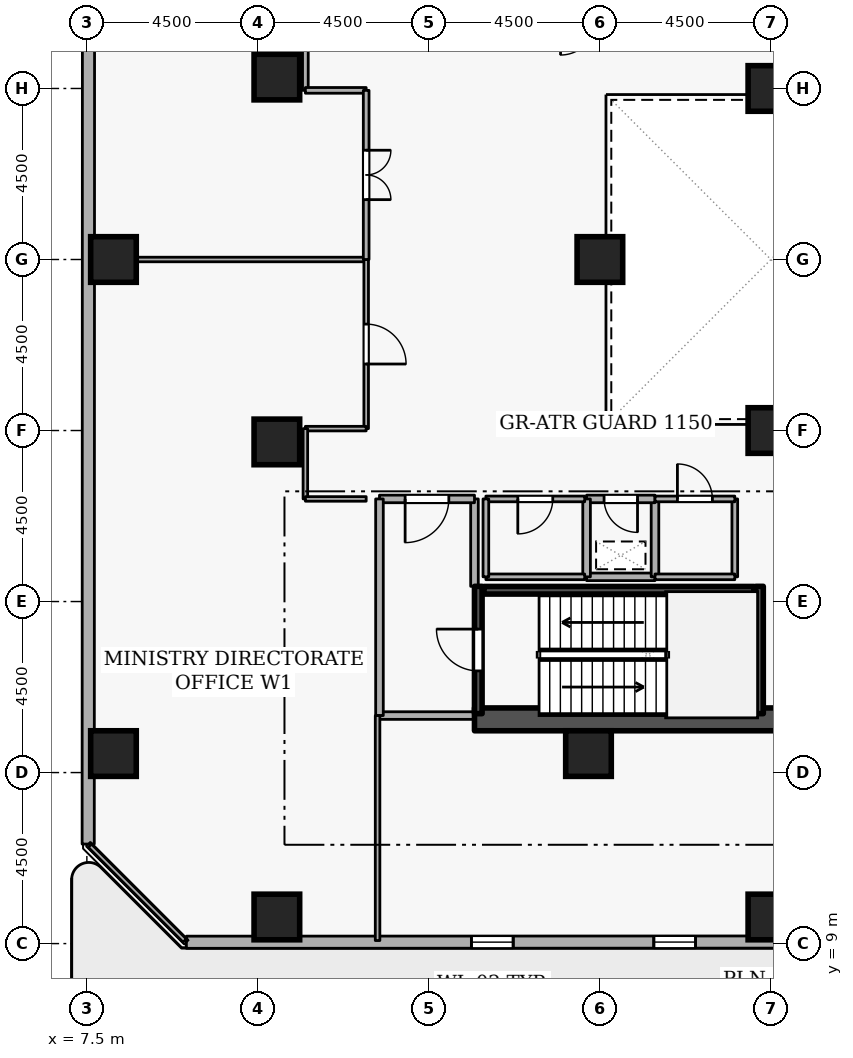
"""IFC4 building model, lengths in metres.
Left out: names, types, materials, properties, quantities, classifications, styles, units other than length and angle.
Written with IfcOpenShell. Run it as: python <this file> out.ifc"""

import sys

from ifc_helpers import new_model, si_unit, direction, frame, frame_2d, origin, origin_2d, place, context, subcontext, project, spatial, rectangle, extrude, element, fill, save


model = new_model("IFC4")
c1 = context("Model", 3, precision=1e-05, world=origin(), true_north=direction((0.0, 1.0)))
c2 = subcontext(c1, "Body", "Model", "MODEL_VIEW")
j1 = project(units=[si_unit("LENGTHUNIT", "METRE"), si_unit("PLANEANGLEUNIT", "RADIAN")], contexts=[c1])
p1 = place(None, origin())
s1 = spatial("IfcSite", under=j1, at=p1, CompositionType="ELEMENT")
p2 = place(p1, origin())
s2 = spatial("IfcBuilding", under=s1, at=p2, CompositionType="ELEMENT")
p3 = place(p2, frame((0.0, 0.0, 75.9)))
s3 = spatial("IfcBuildingStorey", under=s2, at=p3, CompositionType="ELEMENT", Elevation=75.9)
p4 = place(p3, frame((17.7, 14.9, 0.0), z_axis=(0.0, 0.0, 1.0), x_axis=(1.0, 0.0, 0.0)))
e1 = element("IfcWall", 1, at=p4, inside=s3, PredefinedType="SHEAR", context=c2, shape_type="SweptSolid", body=[
    extrude(rectangle(XDim=15.6, YDim=0.6, at=frame_2d((7.8, 0.0))), origin(), (0.0, 0.0, 1.0), 4.2),
])
for number, where, z_axis, x_axis in (
    (2, (12.5, 9.7, 0.0), (0.0, 0.0, 1.0), (1.0, 0.0, 0.0)),
    (3, (25.5, 9.7, 0.0), (0.0, 0.0, 1.0), (1.0, 0.0, 0.0)),
    (4, (8.2, 14.0, 0.0), (0.0, 0.0, 1.0), (1.0, 0.0, 0.0)),
    (5, (8.2, 27.0, 0.0), (0.0, 0.0, 1.0), (1.0, 0.0, 0.0)),
    (6, (12.5, 22.2, 0.0), (0.0, 0.0, 1.0), (1.0, 0.0, 0.0)),
    (7, (12.5, 31.8, 0.0), (0.0, 0.0, 1.0), (1.0, 0.0, 0.0)),
    (8, (20.7, 14.0, 0.0), (0.0, 0.0, 1.0), (1.0, 0.0, 0.0)),
    (9, (25.5, 22.5, 0.0), (0.0, 0.0, 1.0), (1.0, 0.0, 0.0)),
    (10, (25.5, 31.5, 0.0), (0.0, 0.0, 1.0), (1.0, 0.0, 0.0)),
    (11, (21.0, 27.0, 0.0), (0.0, 0.0, 1.0), (1.0, 0.0, 0.0)),
):
    element("IfcColumn", number, at=place(p3, frame(where, z_axis=z_axis, x_axis=x_axis)), inside=s3, PredefinedType="COLUMN", context=c2, shape_type="SweptSolid", body=[
        extrude(rectangle(XDim=1.2, YDim=1.2, at=origin_2d()), origin(), (0.0, 0.0, 1.0), 4.2),
    ])
p5 = place(p3, frame((10.119, 9.035, 0.0), z_axis=(0.0, 0.0, 1.0), x_axis=(0.99999993762, 0.000353213856, 0.0)))
e12 = element("IfcWall", 12, at=p5, inside=s3, PredefinedType="STANDARD", context=c2, shape_type="SweptSolid", body=[
    extrude(rectangle(XDim=33.177, YDim=0.32, at=frame_2d((16.589, 0.0))), origin(), (0.0, 0.0, 1.0), 3.3),
])
p6 = place(p5, frame((30.014, 0.0, 0.0)))
e13 = element("IfcOpeningElement", 13, at=p6, cuts=e12, PredefinedType="OPENING", context=c2, shape_type="SweptSolid", body=[
    extrude(rectangle(XDim=1.15, YDim=2.1, at=frame_2d((0.575, 1.05))), frame((0.0, 0.17, 0.0), z_axis=(0.0, -1.0, 0.0), x_axis=(1.0, 0.0, 0.0)), (0.0, 0.0, 1.0), 0.34),
])
p7 = place(p5, frame((7.5, 0.0, 0.72)))
e14 = element("IfcOpeningElement", 14, at=p7, cuts=e12, PredefinedType="OPENING", context=c2, shape_type="SweptSolid", body=[
    extrude(rectangle(XDim=1.1, YDim=1.8, at=frame_2d((0.55, 0.9))), frame((0.0, 0.17, 0.0), z_axis=(0.0, -1.0, 0.0), x_axis=(1.0, 0.0, 0.0)), (0.0, 0.0, 1.0), 0.34),
])
p8 = place(p5, frame((12.3, 0.0, 0.72)))
e15 = element("IfcOpeningElement", 15, at=p8, cuts=e12, PredefinedType="OPENING", context=c2, shape_type="SweptSolid", body=[
    extrude(rectangle(XDim=1.1, YDim=1.8, at=frame_2d((0.55, 0.9))), frame((0.0, 0.17, 0.0), z_axis=(0.0, -1.0, 0.0), x_axis=(1.0, 0.0, 0.0)), (0.0, 0.0, 1.0), 0.34),
])
p9 = place(p5, frame((17.1, 0.0, 0.72)))
e16 = element("IfcOpeningElement", 16, at=p9, cuts=e12, PredefinedType="OPENING", context=c2, shape_type="SweptSolid", body=[
    extrude(rectangle(XDim=1.1, YDim=1.8, at=frame_2d((0.55, 0.9))), frame((0.0, 0.17, 0.0), z_axis=(0.0, -1.0, 0.0), x_axis=(1.0, 0.0, 0.0)), (0.0, 0.0, 1.0), 0.34),
])
p10 = place(p5, frame((21.9, 0.0, 0.72)))
e17 = element("IfcOpeningElement", 17, at=p10, cuts=e12, PredefinedType="OPENING", context=c2, shape_type="SweptSolid", body=[
    extrude(rectangle(XDim=1.1, YDim=1.8, at=frame_2d((0.55, 0.9))), frame((0.0, 0.17, 0.0), z_axis=(0.0, -1.0, 0.0), x_axis=(1.0, 0.0, 0.0)), (0.0, 0.0, 1.0), 0.34),
])
p11 = place(p3, frame((7.547, 44.796, 0.0), z_axis=(0.0, 0.0, 1.0), x_axis=(-0.000353213856, -0.99999993762, 0.0)))
e18 = element("IfcWall", 18, at=p11, inside=s3, PredefinedType="STANDARD", context=c2, shape_type="SweptSolid", body=[
    extrude(rectangle(XDim=33.177, YDim=0.32, at=frame_2d((16.589, 0.0))), origin(), (0.0, 0.0, 1.0), 3.3),
])
p12 = place(p3, frame((17.8, 15.05, 0.0), z_axis=(0.0, 0.0, 1.0), x_axis=(0.0, 1.0, 0.0)))
e19 = element("IfcWall", 19, at=p12, inside=s3, PredefinedType="SHEAR", context=c2, shape_type="SweptSolid", body=[
    extrude(rectangle(XDim=3.35, YDim=0.2, at=frame_2d((1.675, 0.0))), origin(), (0.0, 0.0, 1.0), 4.2),
])
p13 = place(p12, frame((1.125, 0.0, 0.0)))
e20 = element("IfcOpeningElement", 20, at=p13, cuts=e19, PredefinedType="OPENING", context=c2, shape_type="SweptSolid", body=[
    extrude(rectangle(XDim=1.1, YDim=2.1, at=frame_2d((0.55, 1.05))), frame((0.0, 0.11, 0.0), z_axis=(0.0, -1.0, 0.0), x_axis=(1.0, 0.0, 0.0)), (0.0, 0.0, 1.0), 0.22),
])
p14 = place(p3, frame((25.2, 18.4, 0.0), z_axis=(0.0, 0.0, 1.0), x_axis=(0.0, -1.0, 0.0)))
e21 = element("IfcWall", 21, at=p14, inside=s3, PredefinedType="SHEAR", context=c2, shape_type="SweptSolid", body=[
    extrude(rectangle(XDim=3.35, YDim=0.2, at=frame_2d((1.675, 0.0))), origin(), (0.0, 0.0, 1.0), 4.2),
])
p15 = place(p3, frame((25.05, 18.297, 0.0), z_axis=(0.0, 0.0, 1.0), x_axis=(-1.0, 0.0, 0.0)))
e22 = element("IfcWall", 22, at=p15, inside=s3, PredefinedType="SHEAR", context=c2, shape_type="SweptSolid", body=[
    extrude(rectangle(XDim=7.1, YDim=0.2, at=frame_2d((3.55, 0.0))), origin(), (0.0, 0.0, 1.0), 4.2),
])
p16 = place(p3, frame((15.2, 15.0, 0.0), z_axis=(0.0, 0.0, 1.0), x_axis=(1.0, 0.0, 0.0)))
e23 = element("IfcWall", 23, at=p16, inside=s3, PredefinedType="STANDARD", context=c2, shape_type="SweptSolid", body=[
    extrude(rectangle(XDim=2.5, YDim=0.2, at=frame_2d((1.25, 0.0))), origin(), (0.0, 0.0, 1.0), 3.94),
])
p17 = place(p3, frame((17.7, 18.4, 0.0), z_axis=(0.0, 0.0, 1.0), x_axis=(0.0, 1.0, 0.0)))
e24 = element("IfcWall", 24, at=p17, inside=s3, PredefinedType="STANDARD", context=c2, shape_type="SweptSolid", body=[
    extrude(rectangle(XDim=2.3, YDim=0.2, at=frame_2d((1.15, 0.0))), origin(), (0.0, 0.0, 1.0), 3.145),
])
p18 = place(p3, frame((17.7, 20.7, 0.0), z_axis=(0.0, 0.0, 1.0), x_axis=(-1.0, 0.0, 0.0)))
e25 = element("IfcWall", 25, at=p18, inside=s3, PredefinedType="STANDARD", context=c2, shape_type="SweptSolid", body=[
    extrude(rectangle(XDim=2.5, YDim=0.2, at=frame_2d((1.25, 0.0))), origin(), (0.0, 0.0, 1.0), 3.94),
])
p19 = place(p18, frame((0.675, 0.0, 0.0)))
e26 = element("IfcOpeningElement", 26, at=p19, cuts=e25, PredefinedType="OPENING", context=c2, shape_type="SweptSolid", body=[
    extrude(rectangle(XDim=1.15, YDim=2.1, at=frame_2d((0.575, 1.05))), frame((0.0, 0.11, 0.0), z_axis=(0.0, -1.0, 0.0), x_axis=(1.0, 0.0, 0.0)), (0.0, 0.0, 1.0), 0.22),
])
p20 = place(p3, frame((15.2, 20.7, 0.0), z_axis=(0.0, 0.0, 1.0), x_axis=(0.0, -1.0, 0.0)))
e27 = element("IfcWall", 27, at=p20, inside=s3, PredefinedType="STANDARD", context=c2, shape_type="SweptSolid", body=[
    extrude(rectangle(XDim=5.7, YDim=0.2, at=frame_2d((2.85, 0.0))), origin(), (0.0, 0.0, 1.0), 3.94),
])
p21 = place(p3, frame((20.65, 18.65, 0.0), z_axis=(0.0, 0.0, 1.0), x_axis=(1.0, 0.0, 0.0)))
e28 = element("IfcWall", 28, at=p21, inside=s3, PredefinedType="STANDARD", context=c2, shape_type="SweptSolid", body=[
    extrude(rectangle(XDim=1.8, YDim=0.2, at=frame_2d((0.9, 0.0))), origin(), (0.0, 0.0, 1.0), 3.94),
])
p22 = place(p3, frame((22.45, 18.65, 0.0), z_axis=(0.0, 0.0, 1.0), x_axis=(0.0, 1.0, 0.0)))
e29 = element("IfcWall", 29, at=p22, inside=s3, PredefinedType="STANDARD", context=c2, shape_type="SweptSolid", body=[
    extrude(rectangle(XDim=2.05, YDim=0.2, at=frame_2d((1.025, 0.0))), origin(), (0.0, 0.0, 1.0), 3.94),
])
p23 = place(p3, frame((22.45, 20.7, 0.0), z_axis=(0.0, 0.0, 1.0), x_axis=(-1.0, 0.0, 0.0)))
e30 = element("IfcWall", 30, at=p23, inside=s3, PredefinedType="STANDARD", context=c2, shape_type="SweptSolid", body=[
    extrude(rectangle(XDim=1.8, YDim=0.2, at=frame_2d((0.9, 0.0))), origin(), (0.0, 0.0, 1.0), 3.94),
])
p24 = place(p23, frame((0.46, 0.0, 0.0)))
e31 = element("IfcOpeningElement", 31, at=p24, cuts=e30, PredefinedType="OPENING", context=c2, shape_type="SweptSolid", body=[
    extrude(rectangle(XDim=0.88, YDim=2.04, at=frame_2d((0.44, 1.02))), frame((0.0, 0.11, 0.0), z_axis=(0.0, -1.0, 0.0), x_axis=(1.0, 0.0, 0.0)), (0.0, 0.0, 1.0), 0.22),
])
p25 = place(p3, frame((20.65, 20.7, 0.0), z_axis=(0.0, 0.0, 1.0), x_axis=(0.0, -1.0, 0.0)))
e32 = element("IfcWall", 32, at=p25, inside=s3, PredefinedType="STANDARD", context=c2, shape_type="SweptSolid", body=[
    extrude(rectangle(XDim=2.05, YDim=0.2, at=frame_2d((1.025, 0.0))), origin(), (0.0, 0.0, 1.0), 3.94),
])
p26 = place(p3, frame((18.0, 18.65, 0.0), z_axis=(0.0, 0.0, 1.0), x_axis=(1.0, 0.0, 0.0)))
e33 = element("IfcWall", 33, at=p26, inside=s3, PredefinedType="PARTITIONING", context=c2, shape_type="SweptSolid", body=[
    extrude(rectangle(XDim=2.6, YDim=0.15, at=frame_2d((1.3, 0.0))), origin(), (0.0, 0.0, 1.0), 3.94),
])
p27 = place(p3, frame((20.6, 20.7, 0.0), z_axis=(0.0, 0.0, 1.0), x_axis=(-1.0, 0.0, 0.0)))
e34 = element("IfcWall", 34, at=p27, inside=s3, PredefinedType="PARTITIONING", context=c2, shape_type="SweptSolid", body=[
    extrude(rectangle(XDim=2.6, YDim=0.15, at=frame_2d((1.3, 0.0))), origin(), (0.0, 0.0, 1.0), 3.94),
])
p28 = place(p27, frame((0.84, 0.0, 0.0)))
e35 = element("IfcOpeningElement", 35, at=p28, cuts=e34, PredefinedType="OPENING", context=c2, shape_type="SweptSolid", body=[
    extrude(rectangle(XDim=0.92, YDim=2.08, at=frame_2d((0.46, 1.04))), frame((0.0, 0.085, 0.0), z_axis=(0.0, -1.0, 0.0), x_axis=(1.0, 0.0, 0.0)), (0.0, 0.0, 1.0), 0.17),
])
p29 = place(p3, frame((18.0, 20.7, 0.0), z_axis=(0.0, 0.0, 1.0), x_axis=(0.0, -1.0, 0.0)))
e36 = element("IfcWall", 36, at=p29, inside=s3, PredefinedType="PARTITIONING", context=c2, shape_type="SweptSolid", body=[
    extrude(rectangle(XDim=2.05, YDim=0.15, at=frame_2d((1.025, 0.0))), origin(), (0.0, 0.0, 1.0), 3.145),
])
p30 = place(p3, frame((24.55, 20.7, 0.0), z_axis=(0.0, 0.0, 1.0), x_axis=(0.0, -1.0, 0.0)))
e37 = element("IfcWall", 37, at=p30, inside=s3, PredefinedType="PARTITIONING", context=c2, shape_type="SweptSolid", body=[
    extrude(rectangle(XDim=2.05, YDim=0.15, at=frame_2d((1.025, 0.0))), origin(), (0.0, 0.0, 1.0), 3.94),
])
p31 = place(p3, frame((24.55, 18.65, 0.0), z_axis=(0.0, 0.0, 1.0), x_axis=(-1.0, 0.0, 0.0)))
e38 = element("IfcWall", 38, at=p31, inside=s3, PredefinedType="PARTITIONING", context=c2, shape_type="SweptSolid", body=[
    extrude(rectangle(XDim=2.1, YDim=0.15, at=frame_2d((1.05, 0.0))), origin(), (0.0, 0.0, 1.0), 3.94),
])
p32 = place(p3, frame((22.45, 20.7, 0.0), z_axis=(0.0, 0.0, 1.0), x_axis=(1.0, 0.0, 0.0)))
e39 = element("IfcWall", 39, at=p32, inside=s3, PredefinedType="PARTITIONING", context=c2, shape_type="SweptSolid", body=[
    extrude(rectangle(XDim=2.1, YDim=0.15, at=frame_2d((1.05, 0.0))), origin(), (0.0, 0.0, 1.0), 3.94),
])
p33 = place(p32, frame((0.59, 0.0, 0.0)))
e40 = element("IfcOpeningElement", 40, at=p33, cuts=e39, PredefinedType="OPENING", context=c2, shape_type="SweptSolid", body=[
    extrude(rectangle(XDim=0.92, YDim=2.08, at=frame_2d((0.46, 1.04))), frame((0.0, 0.085, 0.0), z_axis=(0.0, -1.0, 0.0), x_axis=(1.0, 0.0, 0.0)), (0.0, 0.0, 1.0), 0.17),
])
p34 = place(p3, frame((7.58, 27.0, 0.0), z_axis=(0.0, 0.0, 1.0), x_axis=(1.0, 0.0, 0.0)))
e41 = element("IfcWall", 41, at=p34, inside=s3, PredefinedType="PARTITIONING", context=c2, shape_type="SweptSolid", body=[
    extrude(rectangle(XDim=7.27, YDim=0.12, at=frame_2d((3.635, 0.0))), origin(), (0.0, 0.0, 1.0), 3.482),
])
p35 = place(p3, frame((14.85, 27.0, 0.0), z_axis=(0.0, 0.0, 1.0), x_axis=(0.0, -1.0, 0.0)))
e42 = element("IfcWall", 42, at=p35, inside=s3, PredefinedType="PARTITIONING", context=c2, shape_type="SweptSolid", body=[
    extrude(rectangle(XDim=4.45, YDim=0.12, at=frame_2d((2.225, 0.0))), origin(), (0.0, 0.0, 1.0), 3.94),
])
p36 = place(p35, frame((1.7, 0.0, 0.0)))
e43 = element("IfcOpeningElement", 43, at=p36, cuts=e42, PredefinedType="OPENING", context=c2, shape_type="SweptSolid", body=[
    extrude(rectangle(XDim=1.05, YDim=2.1, at=frame_2d((0.525, 1.05))), frame((0.0, 0.07, 0.0), z_axis=(0.0, -1.0, 0.0), x_axis=(1.0, 0.0, 0.0)), (0.0, 0.0, 1.0), 0.14),
])
p37 = place(p3, frame((14.85, 22.55, 0.0), z_axis=(0.0, 0.0, 1.0), x_axis=(-1.0, 0.0, 0.0)))
e44 = element("IfcWall", 44, at=p37, inside=s3, PredefinedType="PARTITIONING", context=c2, shape_type="SweptSolid", body=[
    extrude(rectangle(XDim=1.6, YDim=0.12, at=frame_2d((0.8, 0.0))), origin(), (0.0, 0.0, 1.0), 3.94),
])
p38 = place(p3, frame((13.25, 22.55, 0.0), z_axis=(0.0, 0.0, 1.0), x_axis=(0.0, -1.0, 0.0)))
e45 = element("IfcWall", 45, at=p38, inside=s3, PredefinedType="PARTITIONING", context=c2, shape_type="SweptSolid", body=[
    extrude(rectangle(XDim=1.85, YDim=0.12, at=frame_2d((0.925, 0.0))), origin(), (0.0, 0.0, 1.0), 3.94),
])
p39 = place(p3, frame((13.25, 20.7, 0.0), z_axis=(0.0, 0.0, 1.0), x_axis=(1.0, 0.0, 0.0)))
e46 = element("IfcWall", 46, at=p39, inside=s3, PredefinedType="PARTITIONING", context=c2, shape_type="SweptSolid", body=[
    extrude(rectangle(XDim=1.6, YDim=0.12, at=frame_2d((0.8, 0.0))), origin(), (0.0, 0.0, 1.0), 3.94),
])
p40 = place(p3, frame((15.15, 15.0, 0.0), z_axis=(0.0, 0.0, 1.0), x_axis=(0.0, -1.0, 0.0)))
e47 = element("IfcWall", 47, at=p40, inside=s3, PredefinedType="PARTITIONING", context=c2, shape_type="SweptSolid", body=[
    extrude(rectangle(XDim=5.92, YDim=0.12, at=frame_2d((2.96, 0.0))), origin(), (0.0, 0.0, 1.0), 3.94),
])
p41 = place(p3, frame((10.075, 9.08, 0.0), z_axis=(0.0, 0.0, 1.0), x_axis=(-0.707106781187, 0.707106781187, 0.0)))
e48 = element("IfcWall", 48, at=p41, inside=s3, PredefinedType="PARTITIONING", context=c2, shape_type="SweptSolid", body=[
    extrude(rectangle(XDim=3.528, YDim=0.12, at=frame_2d((1.764, 0.0))), origin(), (0.0, 0.0, 1.0), 3.94),
])
p42 = place(p3, frame((13.25, 33.3, 0.0), z_axis=(0.0, 0.0, 1.0), x_axis=(0.0, -1.0, 0.0)))
e49 = element("IfcWall", 49, at=p42, inside=s3, PredefinedType="PARTITIONING", context=c2, shape_type="SweptSolid", body=[
    extrude(rectangle(XDim=1.85, YDim=0.15, at=frame_2d((0.925, 0.0))), origin(), (0.0, 0.0, 1.0), 3.94),
])
p43 = place(p3, frame((13.25, 31.45, 0.0), z_axis=(0.0, 0.0, 1.0), x_axis=(1.0, 0.0, 0.0)))
e50 = element("IfcWall", 50, at=p43, inside=s3, PredefinedType="PARTITIONING", context=c2, shape_type="SweptSolid", body=[
    extrude(rectangle(XDim=1.6, YDim=0.15, at=frame_2d((0.8, 0.0))), origin(), (0.0, 0.0, 1.0), 3.94),
])
p44 = place(p3, frame((14.85, 31.45, 0.0), z_axis=(0.0, 0.0, 1.0), x_axis=(0.0, -1.0, 0.0)))
e51 = element("IfcWall", 51, at=p44, inside=s3, PredefinedType="PARTITIONING", context=c2, shape_type="SweptSolid", body=[
    extrude(rectangle(XDim=4.45, YDim=0.15, at=frame_2d((2.225, 0.0))), origin(), (0.0, 0.0, 1.0), 3.94),
])
p45 = place(p44, frame((1.575, 0.0, 0.0)))
e52 = element("IfcOpeningElement", 52, at=p45, cuts=e51, PredefinedType="OPENING", context=c2, shape_type="SweptSolid", body=[
    extrude(rectangle(XDim=1.3, YDim=2.12, at=frame_2d((0.65, 1.06))), frame((0.0, 0.085, 0.0), z_axis=(0.0, -1.0, 0.0), x_axis=(1.0, 0.0, 0.0)), (0.0, 0.0, 1.0), 0.17),
])
p46 = place(p7, origin())
e53 = element("IfcWindow", 53, at=p46, inside=s3, PartitioningType="SINGLE_PANEL", PredefinedType="WINDOW", context=c2, shape_type="SweptSolid", body=[
    extrude(rectangle(XDim=1.1, YDim=1.8, at=frame_2d((0.55, 0.9))), frame((0.0, 0.03, 0.0), z_axis=(0.0, -1.0, 0.0), x_axis=(1.0, 0.0, 0.0)), (0.0, 0.0, 1.0), 0.06),
])
fill(e14, e53)
p47 = place(p8, origin())
e54 = element("IfcWindow", 54, at=p47, inside=s3, PartitioningType="SINGLE_PANEL", PredefinedType="WINDOW", context=c2, shape_type="SweptSolid", body=[
    extrude(rectangle(XDim=1.1, YDim=1.8, at=frame_2d((0.55, 0.9))), frame((0.0, 0.03, 0.0), z_axis=(0.0, -1.0, 0.0), x_axis=(1.0, 0.0, 0.0)), (0.0, 0.0, 1.0), 0.06),
])
fill(e15, e54)
p48 = place(p13, origin())
e55 = element("IfcDoor", 55, at=p48, inside=s3, OperationType="SINGLE_SWING_RIGHT", PredefinedType="DOOR", context=c2, shape_type="SweptSolid", body=[
    extrude(rectangle(XDim=1.1, YDim=2.1, at=frame_2d((0.55, 1.05))), frame((0.0, 0.025, 0.0), z_axis=(0.0, -1.0, 0.0), x_axis=(1.0, 0.0, 0.0)), (0.0, 0.0, 1.0), 0.05),
])
fill(e20, e55)
p49 = place(p19, origin())
e56 = element("IfcDoor", 56, at=p49, inside=s3, OperationType="SINGLE_SWING_RIGHT", PredefinedType="DOOR", context=c2, shape_type="SweptSolid", body=[
    extrude(rectangle(XDim=1.15, YDim=2.1, at=frame_2d((0.575, 1.05))), frame((0.0, 0.025, 0.0), z_axis=(0.0, -1.0, 0.0), x_axis=(1.0, 0.0, 0.0)), (0.0, 0.0, 1.0), 0.05),
])
fill(e26, e56)
p50 = place(p24, origin())
e57 = element("IfcDoor", 57, at=p50, inside=s3, OperationType="SINGLE_SWING_LEFT", PredefinedType="DOOR", context=c2, shape_type="SweptSolid", body=[
    extrude(rectangle(XDim=0.88, YDim=2.04, at=frame_2d((0.44, 1.02))), frame((0.0, 0.025, 0.0), z_axis=(0.0, -1.0, 0.0), x_axis=(1.0, 0.0, 0.0)), (0.0, 0.0, 1.0), 0.05),
])
fill(e31, e57)
p51 = place(p28, origin())
e58 = element("IfcDoor", 58, at=p51, inside=s3, OperationType="SINGLE_SWING_RIGHT", PredefinedType="DOOR", context=c2, shape_type="SweptSolid", body=[
    extrude(rectangle(XDim=0.92, YDim=2.08, at=frame_2d((0.46, 1.04))), frame((0.0, 0.025, 0.0), z_axis=(0.0, -1.0, 0.0), x_axis=(1.0, 0.0, 0.0)), (0.0, 0.0, 1.0), 0.05),
])
fill(e35, e58)
p52 = place(p33, origin())
e59 = element("IfcDoor", 59, at=p52, inside=s3, OperationType="SINGLE_SWING_LEFT", PredefinedType="DOOR", context=c2, shape_type="SweptSolid", body=[
    extrude(rectangle(XDim=0.92, YDim=2.08, at=frame_2d((0.46, 1.04))), frame((0.0, 0.025, 0.0), z_axis=(0.0, -1.0, 0.0), x_axis=(1.0, 0.0, 0.0)), (0.0, 0.0, 1.0), 0.05),
])
fill(e40, e59)
p53 = place(p36, origin())
e60 = element("IfcDoor", 60, at=p53, inside=s3, OperationType="SINGLE_SWING_RIGHT", PredefinedType="DOOR", context=c2, shape_type="SweptSolid", body=[
    extrude(rectangle(XDim=1.05, YDim=2.1, at=frame_2d((0.525, 1.05))), frame((0.0, 0.025, 0.0), z_axis=(0.0, -1.0, 0.0), x_axis=(1.0, 0.0, 0.0)), (0.0, 0.0, 1.0), 0.05),
])
fill(e43, e60)
p54 = place(p45, origin())
e61 = element("IfcDoor", 61, at=p54, inside=s3, OperationType="DOUBLE_DOOR_SINGLE_SWING", PredefinedType="DOOR", context=c2, shape_type="SweptSolid", body=[
    extrude(rectangle(XDim=1.3, YDim=2.12, at=frame_2d((0.65, 1.06))), frame((0.0, 0.025, 0.0), z_axis=(0.0, -1.0, 0.0), x_axis=(1.0, 0.0, 0.0)), (0.0, 0.0, 1.0), 0.05),
])
fill(e52, e61)
save(model, sys.argv[1])
